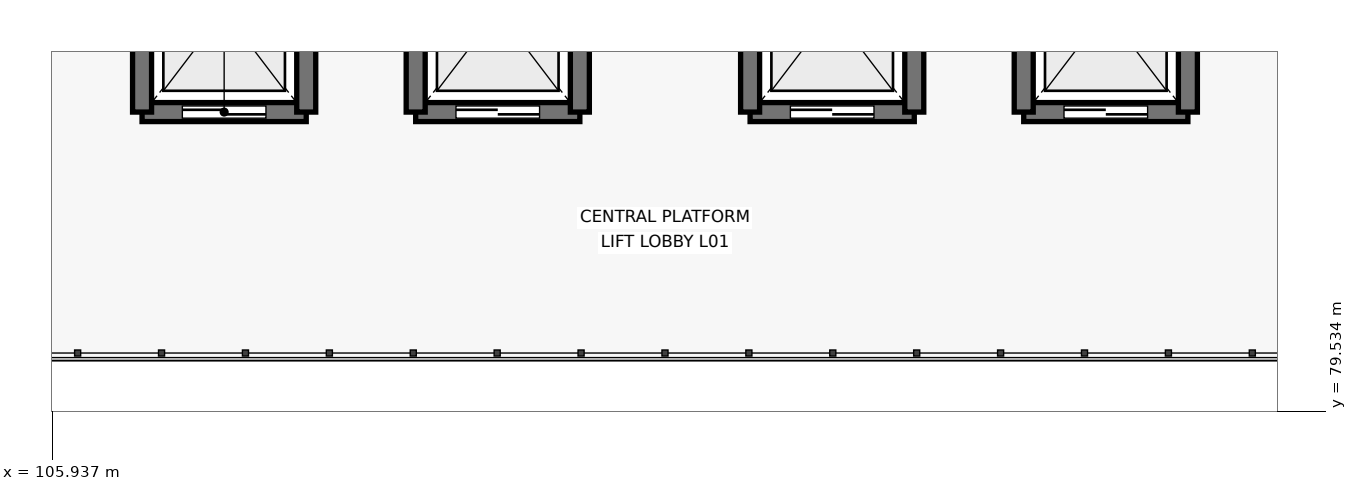
"""IFC4 building model, lengths in metres.
Left out: names, types, materials, properties, quantities, classifications, styles, units other than length and angle.
Written with IfcOpenShell. Run it as: python <this file> out.ifc"""

import sys

from ifc_helpers import new_model, si_unit, direction, frame, frame_2d, origin, place, context, subcontext, project, spatial, rectangle, extrude, element, fill, save


model = new_model("IFC4")
c1 = context("Model", 3, precision=1e-05, world=origin(), true_north=direction((0.0, 1.0)))
c2 = subcontext(c1, "Body", "Model", "MODEL_VIEW")
j1 = project(units=[si_unit("LENGTHUNIT", "METRE"), si_unit("PLANEANGLEUNIT", "RADIAN")], contexts=[c1])
p1 = place(None, origin())
s1 = spatial("IfcSite", under=j1, at=p1, CompositionType="ELEMENT")
p2 = place(p1, origin())
s2 = spatial("IfcBuilding", under=s1, at=p2, CompositionType="ELEMENT")
p3 = place(p2, frame((0.0, 0.0, 5.4)))
s3 = spatial("IfcBuildingStorey", under=s2, at=p3, CompositionType="ELEMENT", Elevation=5.4)
p4 = place(p3, frame((107.12, 83.47, 0.0), z_axis=(0.0, 0.0, 1.0), x_axis=(1.0, 0.0, 0.0)))
e1 = element("IfcWall", 1, at=p4, inside=s3, PredefinedType="SHEAR", context=c2, shape_type="SweptSolid", body=[
    extrude(rectangle(XDim=2.16, YDim=0.25, at=frame_2d((1.08, 0.0))), origin(), (0.0, 0.0, 1.0), 5.14),
])
p5 = place(p4, frame((0.53, 0.0, 0.0)))
e2 = element("IfcOpeningElement", 2, at=p5, cuts=e1, PredefinedType="OPENING", context=c2, shape_type="SweptSolid", body=[
    extrude(rectangle(XDim=1.1, YDim=2.2, at=frame_2d((0.55, 1.1))), frame((0.0, 0.135, 0.0), z_axis=(0.0, -1.0, 0.0), x_axis=(1.0, 0.0, 0.0)), (0.0, 0.0, 1.0), 0.27),
])
for number, where, z_axis, x_axis in (
    (3, (109.28, 83.47, 0.0), (0.0, 0.0, 1.0), (0.0, 1.0, 0.0)),
    (4, (107.12, 86.13, 0.0), (0.0, 0.0, 1.0), (0.0, -1.0, 0.0)),
):
    element("IfcWall", number, at=place(p3, frame(where, z_axis=z_axis, x_axis=x_axis)), inside=s3, PredefinedType="SHEAR", context=c2, shape_type="SweptSolid", body=[
        extrude(rectangle(XDim=2.66, YDim=0.25, at=frame_2d((1.33, 0.0))), origin(), (0.0, 0.0, 1.0), 5.14),
    ])
p6 = place(p3, frame((110.72, 83.47, 0.0), z_axis=(0.0, 0.0, 1.0), x_axis=(1.0, 0.0, 0.0)))
e5 = element("IfcWall", 5, at=p6, inside=s3, PredefinedType="SHEAR", context=c2, shape_type="SweptSolid", body=[
    extrude(rectangle(XDim=2.16, YDim=0.25, at=frame_2d((1.08, 0.0))), origin(), (0.0, 0.0, 1.0), 5.14),
])
p7 = place(p6, frame((0.53, 0.0, 0.0)))
e6 = element("IfcOpeningElement", 6, at=p7, cuts=e5, PredefinedType="OPENING", context=c2, shape_type="SweptSolid", body=[
    extrude(rectangle(XDim=1.1, YDim=2.2, at=frame_2d((0.55, 1.1))), frame((0.0, 0.135, 0.0), z_axis=(0.0, -1.0, 0.0), x_axis=(1.0, 0.0, 0.0)), (0.0, 0.0, 1.0), 0.27),
])
for number, where, z_axis, x_axis in (
    (7, (112.88, 83.47, 0.0), (0.0, 0.0, 1.0), (0.0, 1.0, 0.0)),
    (8, (110.72, 86.13, 0.0), (0.0, 0.0, 1.0), (0.0, -1.0, 0.0)),
):
    element("IfcWall", number, at=place(p3, frame(where, z_axis=z_axis, x_axis=x_axis)), inside=s3, PredefinedType="SHEAR", context=c2, shape_type="SweptSolid", body=[
        extrude(rectangle(XDim=2.66, YDim=0.25, at=frame_2d((1.33, 0.0))), origin(), (0.0, 0.0, 1.0), 5.14),
    ])
p8 = place(p3, frame((115.12, 83.47, 0.0), z_axis=(0.0, 0.0, 1.0), x_axis=(1.0, 0.0, 0.0)))
e9 = element("IfcWall", 9, at=p8, inside=s3, PredefinedType="SHEAR", context=c2, shape_type="SweptSolid", body=[
    extrude(rectangle(XDim=2.16, YDim=0.25, at=frame_2d((1.08, 0.0))), origin(), (0.0, 0.0, 1.0), 5.14),
])
p9 = place(p8, frame((0.53, 0.0, 0.0)))
e10 = element("IfcOpeningElement", 10, at=p9, cuts=e9, PredefinedType="OPENING", context=c2, shape_type="SweptSolid", body=[
    extrude(rectangle(XDim=1.1, YDim=2.2, at=frame_2d((0.55, 1.1))), frame((0.0, 0.135, 0.0), z_axis=(0.0, -1.0, 0.0), x_axis=(1.0, 0.0, 0.0)), (0.0, 0.0, 1.0), 0.27),
])
for number, where, z_axis, x_axis in (
    (11, (117.28, 83.47, 0.0), (0.0, 0.0, 1.0), (0.0, 1.0, 0.0)),
    (12, (115.12, 86.13, 0.0), (0.0, 0.0, 1.0), (0.0, -1.0, 0.0)),
):
    element("IfcWall", number, at=place(p3, frame(where, z_axis=z_axis, x_axis=x_axis)), inside=s3, PredefinedType="SHEAR", context=c2, shape_type="SweptSolid", body=[
        extrude(rectangle(XDim=2.66, YDim=0.25, at=frame_2d((1.33, 0.0))), origin(), (0.0, 0.0, 1.0), 5.14),
    ])
p10 = place(p3, frame((118.72, 83.47, 0.0), z_axis=(0.0, 0.0, 1.0), x_axis=(1.0, 0.0, 0.0)))
e13 = element("IfcWall", 13, at=p10, inside=s3, PredefinedType="SHEAR", context=c2, shape_type="SweptSolid", body=[
    extrude(rectangle(XDim=2.16, YDim=0.25, at=frame_2d((1.08, 0.0))), origin(), (0.0, 0.0, 1.0), 5.14),
])
p11 = place(p10, frame((0.53, 0.0, 0.0)))
e14 = element("IfcOpeningElement", 14, at=p11, cuts=e13, PredefinedType="OPENING", context=c2, shape_type="SweptSolid", body=[
    extrude(rectangle(XDim=1.1, YDim=2.2, at=frame_2d((0.55, 1.1))), frame((0.0, 0.135, 0.0), z_axis=(0.0, -1.0, 0.0), x_axis=(1.0, 0.0, 0.0)), (0.0, 0.0, 1.0), 0.27),
])
for number, where, z_axis, x_axis in (
    (15, (120.88, 83.47, 0.0), (0.0, 0.0, 1.0), (0.0, 1.0, 0.0)),
    (16, (118.72, 86.13, 0.0), (0.0, 0.0, 1.0), (0.0, -1.0, 0.0)),
):
    element("IfcWall", number, at=place(p3, frame(where, z_axis=z_axis, x_axis=x_axis)), inside=s3, PredefinedType="SHEAR", context=c2, shape_type="SweptSolid", body=[
        extrude(rectangle(XDim=2.66, YDim=0.25, at=frame_2d((1.33, 0.0))), origin(), (0.0, 0.0, 1.0), 5.14),
    ])
p12 = place(p5, origin())
e17 = element("IfcDoor", 17, at=p12, inside=s3, OperationType="SLIDING_TO_LEFT", PredefinedType="DOOR", context=c2, shape_type="SweptSolid", body=[
    extrude(rectangle(XDim=1.1, YDim=2.2, at=frame_2d((0.55, 1.1))), frame((0.0, 0.025, 0.0), z_axis=(0.0, -1.0, 0.0), x_axis=(1.0, 0.0, 0.0)), (0.0, 0.0, 1.0), 0.05),
])
fill(e2, e17)
p13 = place(p7, origin())
e18 = element("IfcDoor", 18, at=p13, inside=s3, OperationType="SLIDING_TO_LEFT", PredefinedType="DOOR", context=c2, shape_type="SweptSolid", body=[
    extrude(rectangle(XDim=1.1, YDim=2.2, at=frame_2d((0.55, 1.1))), frame((0.0, 0.025, 0.0), z_axis=(0.0, -1.0, 0.0), x_axis=(1.0, 0.0, 0.0)), (0.0, 0.0, 1.0), 0.05),
])
fill(e6, e18)
p14 = place(p9, origin())
e19 = element("IfcDoor", 19, at=p14, inside=s3, OperationType="SLIDING_TO_LEFT", PredefinedType="DOOR", context=c2, shape_type="SweptSolid", body=[
    extrude(rectangle(XDim=1.1, YDim=2.2, at=frame_2d((0.55, 1.1))), frame((0.0, 0.025, 0.0), z_axis=(0.0, -1.0, 0.0), x_axis=(1.0, 0.0, 0.0)), (0.0, 0.0, 1.0), 0.05),
])
fill(e10, e19)
p15 = place(p11, origin())
e20 = element("IfcDoor", 20, at=p15, inside=s3, OperationType="SLIDING_TO_LEFT", PredefinedType="DOOR", context=c2, shape_type="SweptSolid", body=[
    extrude(rectangle(XDim=1.1, YDim=2.2, at=frame_2d((0.55, 1.1))), frame((0.0, 0.025, 0.0), z_axis=(0.0, -1.0, 0.0), x_axis=(1.0, 0.0, 0.0)), (0.0, 0.0, 1.0), 0.05),
])
fill(e14, e20)
save(model, sys.argv[1])
